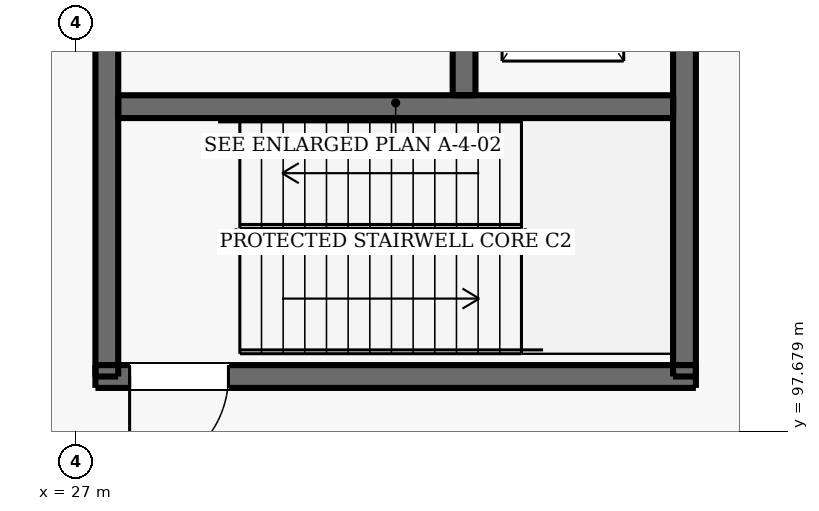
"""IFC4 building model, lengths in metres.
Left out: names, types, materials, properties, quantities, classifications, styles, units other than length and angle.
Written with IfcOpenShell. Run it as: python <this file> out.ifc"""

import sys

from ifc_helpers import new_model, si_unit, direction, frame, frame_2d, origin, place, context, subcontext, project, spatial, rectangle, extrude, element, fill, save


model = new_model("IFC4")
c1 = context("Model", 3, precision=1e-05, world=origin(), true_north=direction((0.0, 1.0)))
c2 = subcontext(c1, "Body", "Model", "MODEL_VIEW")
j1 = project(units=[si_unit("LENGTHUNIT", "METRE"), si_unit("PLANEANGLEUNIT", "RADIAN")], contexts=[c1])
p1 = place(None, origin())
s1 = spatial("IfcSite", under=j1, at=p1, CompositionType="ELEMENT")
p2 = place(p1, origin())
s2 = spatial("IfcBuilding", under=s1, at=p2, CompositionType="ELEMENT")
p3 = place(p2, frame((0.0, 0.0, -4.8)))
s3 = spatial("IfcBuildingStorey", under=s2, at=p3, CompositionType="ELEMENT", Elevation=-4.8)
p4 = place(p3, frame((27.25, 98.4, 0.0), z_axis=(0.0, 0.0, 1.0), x_axis=(1.0, 0.0, 0.0)))
e1 = element("IfcWall", 1, at=p4, inside=s3, PredefinedType="SHEAR", context=c2, shape_type="SweptSolid", body=[
    extrude(rectangle(XDim=7.9, YDim=0.3, at=frame_2d((3.95, 0.0))), origin(), (0.0, 0.0, 1.0), 4.8),
])
p5 = place(p4, frame((0.45, 0.0, 0.0)))
e2 = element("IfcOpeningElement", 2, at=p5, cuts=e1, PredefinedType="OPENING", context=c2, shape_type="SweptSolid", body=[
    extrude(rectangle(XDim=1.3, YDim=2.15, at=frame_2d((0.65, 1.075))), frame((0.0, 0.16, 0.0), z_axis=(0.0, -1.0, 0.0), x_axis=(1.0, 0.0, 0.0)), (0.0, 0.0, 1.0), 0.32),
])
for number, where, z_axis, x_axis in (
    (3, (27.4, 98.4, 0.0), (0.0, 0.0, 1.0), (0.0, 1.0, 0.0)),
    (4, (35.0, 98.4, 0.0), (0.0, 0.0, 1.0), (0.0, 1.0, 0.0)),
):
    element("IfcWall", number, at=place(p3, frame(where, z_axis=z_axis, x_axis=x_axis)), inside=s3, PredefinedType="SHEAR", context=c2, shape_type="SweptSolid", body=[
        extrude(rectangle(XDim=7.2, YDim=0.3, at=frame_2d((3.6, 0.0))), origin(), (0.0, 0.0, 1.0), 4.8),
    ])
p6 = place(p3, frame((27.55, 101.95, 0.0), z_axis=(0.0, 0.0, 1.0), x_axis=(1.0, 0.0, 0.0)))
e5 = element("IfcWall", 5, at=p6, inside=s3, PredefinedType="SHEAR", context=c2, shape_type="SweptSolid", body=[
    extrude(rectangle(XDim=7.3, YDim=0.3, at=frame_2d((3.65, 0.0))), origin(), (0.0, 0.0, 1.0), 4.8),
])
p7 = place(p3, frame((32.1, 102.1, 0.0), z_axis=(0.0, 0.0, 1.0), x_axis=(0.0, 1.0, 0.0)))
e6 = element("IfcWall", 6, at=p7, inside=s3, PredefinedType="SHEAR", context=c2, shape_type="SweptSolid", body=[
    extrude(rectangle(XDim=3.35, YDim=0.3, at=frame_2d((1.675, 0.0))), origin(), (0.0, 0.0, 1.0), 4.8),
])
p8 = place(p7, frame((1.125, 0.0, 0.0)))
e7 = element("IfcOpeningElement", 7, at=p8, cuts=e6, PredefinedType="OPENING", context=c2, shape_type="SweptSolid", body=[
    extrude(rectangle(XDim=1.1, YDim=2.15, at=frame_2d((0.55, 1.075))), frame((0.0, 0.16, 0.0), z_axis=(0.0, -1.0, 0.0), x_axis=(1.0, 0.0, 0.0)), (0.0, 0.0, 1.0), 0.32),
])
p9 = place(p5, frame((1.3, 0.0, 0.0), z_axis=(0.0, 0.0, 1.0), x_axis=(-1.0, 0.0, 0.0)))
e8 = element("IfcDoor", 8, at=p9, inside=s3, OperationType="SINGLE_SWING_LEFT", PredefinedType="DOOR", context=c2, shape_type="SweptSolid", body=[
    extrude(rectangle(XDim=1.3, YDim=2.15, at=frame_2d((0.65, 1.075))), frame((0.0, 0.025, 0.0), z_axis=(0.0, -1.0, 0.0), x_axis=(1.0, 0.0, 0.0)), (0.0, 0.0, 1.0), 0.05),
])
fill(e2, e8)
save(model, sys.argv[1])
